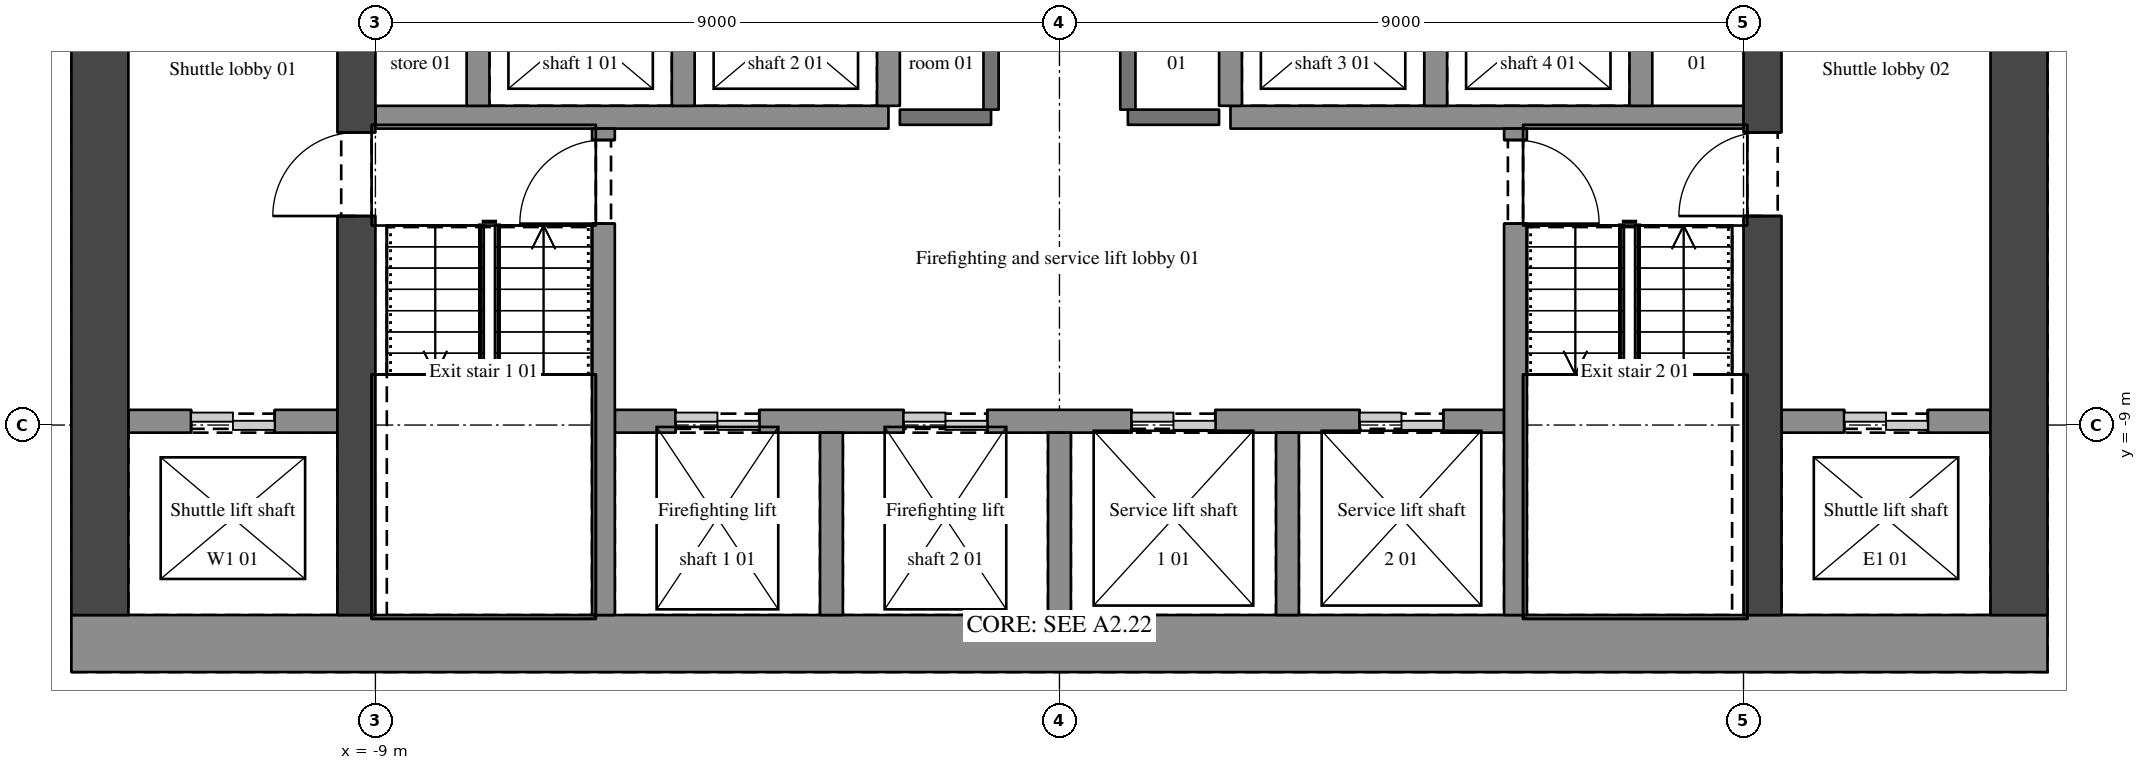
"""IFC4 building model, lengths in metres.
Left out: names, types, materials, properties, quantities, classifications, styles, units other than length and angle.
Written with IfcOpenShell. Run it as: python <this file> out.ifc"""

import sys

from ifc_helpers import new_model, si_unit, direction, frame, frame_2d, origin, place, context, subcontext, project, spatial, rectangle, extrude, element, fill, save


model = new_model("IFC4")
c1 = context("Model", 3, precision=1e-05, world=origin(), true_north=direction((0.0, 1.0)))
c2 = subcontext(c1, "Body", "Model", "MODEL_VIEW")
j1 = project(units=[si_unit("LENGTHUNIT", "METRE"), si_unit("PLANEANGLEUNIT", "RADIAN")], contexts=[c1])
p1 = place(None, origin())
s1 = spatial("IfcSite", under=j1, at=p1, CompositionType="ELEMENT")
p2 = place(p1, origin())
s2 = spatial("IfcBuilding", under=s1, at=p2, CompositionType="ELEMENT")
p3 = place(p2, frame((0.0, 0.0, 162.3)))
s3 = spatial("IfcBuildingStorey", under=s2, at=p3, CompositionType="ELEMENT", Elevation=162.3)
p4 = place(p3, frame((-13.0, -11.875, 0.0), z_axis=(0.0, 0.0, 1.0), x_axis=(1.0, 0.0, 0.0)))
e1 = element("IfcWall", 1, at=p4, inside=s3, PredefinedType="SHEAR", context=c2, shape_type="SweptSolid", body=[
    extrude(rectangle(XDim=26.0, YDim=0.75, at=frame_2d((13.0, 0.0))), origin(), (0.0, 0.0, 1.0), 5.4),
])
p5 = place(p3, frame((-12.625, -11.5, 0.0), z_axis=(0.0, 0.0, 1.0), x_axis=(0.0, 1.0, 0.0)))
e2 = element("IfcWall", 2, at=p5, inside=s3, PredefinedType="SHEAR", context=c2, shape_type="SweptSolid", body=[
    extrude(rectangle(XDim=14.65, YDim=0.75, at=frame_2d((7.325, 0.0))), origin(), (0.0, 0.0, 1.0), 5.4),
])
p6 = place(p5, frame((9.6, 0.0, 0.0)))
e3 = element("IfcOpeningElement", 3, at=p6, cuts=e2, PredefinedType="OPENING", context=c2, shape_type="SweptSolid", body=[
    extrude(rectangle(XDim=1.8, YDim=2.1, at=frame_2d((0.9, 1.05))), frame((0.0, 0.385, 0.0), z_axis=(0.0, -1.0, 0.0), x_axis=(1.0, 0.0, 0.0)), (0.0, 0.0, 1.0), 0.77),
])
p7 = place(p3, frame((12.625, -11.5, 0.0), z_axis=(0.0, 0.0, 1.0), x_axis=(0.0, 1.0, 0.0)))
e4 = element("IfcWall", 4, at=p7, inside=s3, PredefinedType="SHEAR", context=c2, shape_type="SweptSolid", body=[
    extrude(rectangle(XDim=14.65, YDim=0.75, at=frame_2d((7.325, 0.0))), origin(), (0.0, 0.0, 1.0), 5.4),
])
p8 = place(p7, frame((9.6, 0.0, 0.0)))
e5 = element("IfcOpeningElement", 5, at=p8, cuts=e4, PredefinedType="OPENING", context=c2, shape_type="SweptSolid", body=[
    extrude(rectangle(XDim=1.8, YDim=2.1, at=frame_2d((0.9, 1.05))), frame((0.0, 0.385, 0.0), z_axis=(0.0, -1.0, 0.0), x_axis=(1.0, 0.0, 0.0)), (0.0, 0.0, 1.0), 0.77),
])
p9 = place(p3, frame((-9.25, -11.5, 0.0), z_axis=(0.0, 0.0, 1.0), x_axis=(0.0, 1.0, 0.0)))
e6 = element("IfcWall", 6, at=p9, inside=s3, PredefinedType="SHEAR", context=c2, shape_type="SweptSolid", body=[
    extrude(rectangle(XDim=11.65, YDim=0.5, at=frame_2d((5.825, 0.0))), origin(), (0.0, 0.0, 1.0), 5.4),
])
p10 = place(p9, frame((9.4, 0.0, 0.0)))
e7 = element("IfcOpeningElement", 7, at=p10, cuts=e6, PredefinedType="OPENING", context=c2, shape_type="SweptSolid", body=[
    extrude(rectangle(XDim=1.8, YDim=2.1, at=frame_2d((0.9, 1.05))), frame((0.0, 0.26, 0.0), z_axis=(0.0, -1.0, 0.0), x_axis=(1.0, 0.0, 0.0)), (0.0, 0.0, 1.0), 0.52),
])
p11 = place(p9, frame((5.25, 0.0, 0.0)))
e8 = element("IfcOpeningElement", 8, at=p11, cuts=e6, PredefinedType="OPENING", context=c2, shape_type="SweptSolid", body=[
    extrude(rectangle(XDim=1.1, YDim=2.1, at=frame_2d((0.55, 1.05))), frame((0.0, 0.26, 0.0), z_axis=(0.0, -1.0, 0.0), x_axis=(1.0, 0.0, 0.0)), (0.0, 0.0, 1.0), 0.52),
])
p12 = place(p3, frame((9.25, -11.5, 0.0), z_axis=(0.0, 0.0, 1.0), x_axis=(0.0, 1.0, 0.0)))
e9 = element("IfcWall", 9, at=p12, inside=s3, PredefinedType="SHEAR", context=c2, shape_type="SweptSolid", body=[
    extrude(rectangle(XDim=11.65, YDim=0.5, at=frame_2d((5.825, 0.0))), origin(), (0.0, 0.0, 1.0), 5.4),
])
p13 = place(p12, frame((9.4, 0.0, 0.0)))
e10 = element("IfcOpeningElement", 10, at=p13, cuts=e9, PredefinedType="OPENING", context=c2, shape_type="SweptSolid", body=[
    extrude(rectangle(XDim=1.8, YDim=2.1, at=frame_2d((0.9, 1.05))), frame((0.0, 0.26, 0.0), z_axis=(0.0, -1.0, 0.0), x_axis=(1.0, 0.0, 0.0)), (0.0, 0.0, 1.0), 0.52),
])
p14 = place(p12, frame((5.25, 0.0, 0.0)))
e11 = element("IfcOpeningElement", 11, at=p14, cuts=e9, PredefinedType="OPENING", context=c2, shape_type="SweptSolid", body=[
    extrude(rectangle(XDim=1.1, YDim=2.1, at=frame_2d((0.55, 1.05))), frame((0.0, 0.26, 0.0), z_axis=(0.0, -1.0, 0.0), x_axis=(1.0, 0.0, 0.0)), (0.0, 0.0, 1.0), 0.52),
])
p15 = place(p3, frame((-12.25, -8.95, 0.0), z_axis=(0.0, 0.0, 1.0), x_axis=(1.0, 0.0, 0.0)))
e12 = element("IfcWall", 12, at=p15, inside=s3, PredefinedType="SHEAR", context=c2, shape_type="SweptSolid", body=[
    extrude(rectangle(XDim=2.75, YDim=0.3, at=frame_2d((1.375, 0.0))), origin(), (0.0, 0.0, 1.0), 5.4),
])
p16 = place(p15, frame((0.825, 0.0, 0.0)))
e13 = element("IfcOpeningElement", 13, at=p16, cuts=e12, PredefinedType="OPENING", context=c2, shape_type="SweptSolid", body=[
    extrude(rectangle(XDim=1.1, YDim=2.1, at=frame_2d((0.55, 1.05))), frame((0.0, 0.16, 0.0), z_axis=(0.0, -1.0, 0.0), x_axis=(1.0, 0.0, 0.0)), (0.0, 0.0, 1.0), 0.32),
])
p17 = place(p3, frame((-5.85, -8.95, 0.0), z_axis=(0.0, 0.0, 1.0), x_axis=(1.0, 0.0, 0.0)))
e14 = element("IfcWall", 14, at=p17, inside=s3, PredefinedType="SHEAR", context=c2, shape_type="SweptSolid", body=[
    extrude(rectangle(XDim=11.7, YDim=0.3, at=frame_2d((5.85, 0.0))), origin(), (0.0, 0.0, 1.0), 5.4),
])
p18 = place(p17, frame((0.8, 0.0, 0.0)))
e15 = element("IfcOpeningElement", 15, at=p18, cuts=e14, PredefinedType="OPENING", context=c2, shape_type="SweptSolid", body=[
    extrude(rectangle(XDim=1.1, YDim=2.1, at=frame_2d((0.55, 1.05))), frame((0.0, 0.16, 0.0), z_axis=(0.0, -1.0, 0.0), x_axis=(1.0, 0.0, 0.0)), (0.0, 0.0, 1.0), 0.32),
])
p19 = place(p17, frame((3.8, 0.0, 0.0)))
e16 = element("IfcOpeningElement", 16, at=p19, cuts=e14, PredefinedType="OPENING", context=c2, shape_type="SweptSolid", body=[
    extrude(rectangle(XDim=1.1, YDim=2.1, at=frame_2d((0.55, 1.05))), frame((0.0, 0.16, 0.0), z_axis=(0.0, -1.0, 0.0), x_axis=(1.0, 0.0, 0.0)), (0.0, 0.0, 1.0), 0.32),
])
p20 = place(p17, frame((6.8, 0.0, 0.0)))
e17 = element("IfcOpeningElement", 17, at=p20, cuts=e14, PredefinedType="OPENING", context=c2, shape_type="SweptSolid", body=[
    extrude(rectangle(XDim=1.1, YDim=2.1, at=frame_2d((0.55, 1.05))), frame((0.0, 0.16, 0.0), z_axis=(0.0, -1.0, 0.0), x_axis=(1.0, 0.0, 0.0)), (0.0, 0.0, 1.0), 0.32),
])
p21 = place(p17, frame((9.8, 0.0, 0.0)))
e18 = element("IfcOpeningElement", 18, at=p21, cuts=e14, PredefinedType="OPENING", context=c2, shape_type="SweptSolid", body=[
    extrude(rectangle(XDim=1.1, YDim=2.1, at=frame_2d((0.55, 1.05))), frame((0.0, 0.16, 0.0), z_axis=(0.0, -1.0, 0.0), x_axis=(1.0, 0.0, 0.0)), (0.0, 0.0, 1.0), 0.32),
])
p22 = place(p3, frame((9.5, -8.95, 0.0), z_axis=(0.0, 0.0, 1.0), x_axis=(1.0, 0.0, 0.0)))
e19 = element("IfcWall", 19, at=p22, inside=s3, PredefinedType="SHEAR", context=c2, shape_type="SweptSolid", body=[
    extrude(rectangle(XDim=2.75, YDim=0.3, at=frame_2d((1.375, 0.0))), origin(), (0.0, 0.0, 1.0), 5.4),
])
p23 = place(p22, frame((0.825, 0.0, 0.0)))
e20 = element("IfcOpeningElement", 20, at=p23, cuts=e19, PredefinedType="OPENING", context=c2, shape_type="SweptSolid", body=[
    extrude(rectangle(XDim=1.1, YDim=2.1, at=frame_2d((0.55, 1.05))), frame((0.0, 0.16, 0.0), z_axis=(0.0, -1.0, 0.0), x_axis=(1.0, 0.0, 0.0)), (0.0, 0.0, 1.0), 0.32),
])
p24 = place(p3, frame((-9.0, -4.95, 0.0), z_axis=(0.0, 0.0, 1.0), x_axis=(1.0, 0.0, 0.0)))
e21 = element("IfcWall", 21, at=p24, inside=s3, PredefinedType="SHEAR", context=c2, shape_type="SweptSolid", body=[
    extrude(rectangle(XDim=6.75, YDim=0.3, at=frame_2d((3.375, 0.0))), origin(), (0.0, 0.0, 1.0), 5.4),
])
for number, where, z_axis, x_axis in (
    (22, (-2.1, -4.95, 0.0), (0.0, 0.0, 1.0), (1.0, 0.0, 0.0)),
    (23, (0.9, -4.95, 0.0), (0.0, 0.0, 1.0), (1.0, 0.0, 0.0)),
):
    element("IfcWall", number, at=place(p3, frame(where, z_axis=z_axis, x_axis=x_axis)), inside=s3, PredefinedType="SOLIDWALL", context=c2, shape_type="SweptSolid", body=[
        extrude(rectangle(XDim=1.2, YDim=0.2, at=frame_2d((0.6, 0.0))), origin(), (0.0, 0.0, 1.0), 5.1),
    ])
p25 = place(p3, frame((2.25, -4.95, 0.0), z_axis=(0.0, 0.0, 1.0), x_axis=(1.0, 0.0, 0.0)))
e24 = element("IfcWall", 24, at=p25, inside=s3, PredefinedType="SHEAR", context=c2, shape_type="SweptSolid", body=[
    extrude(rectangle(XDim=6.75, YDim=0.3, at=frame_2d((3.375, 0.0))), origin(), (0.0, 0.0, 1.0), 5.4),
])
p26 = place(p3, frame((-7.65, -4.8, 0.0), z_axis=(0.0, 0.0, 1.0), x_axis=(0.0, 1.0, 0.0)))
e25 = element("IfcWall", 25, at=p26, inside=s3, PredefinedType="SHEAR", context=c2, shape_type="SweptSolid", body=[
    extrude(rectangle(XDim=2.05, YDim=0.3, at=frame_2d((1.025, 0.0))), origin(), (0.0, 0.0, 1.0), 5.4),
])
p27 = place(p3, frame((-6.0, -11.5, 0.0), z_axis=(0.0, 0.0, 1.0), x_axis=(0.0, 1.0, 0.0)))
e26 = element("IfcWall", 26, at=p27, inside=s3, PredefinedType="SHEAR", context=c2, shape_type="SweptSolid", body=[
    extrude(rectangle(XDim=6.4, YDim=0.3, at=frame_2d((3.2, 0.0))), origin(), (0.0, 0.0, 1.0), 5.4),
])
p28 = place(p27, frame((5.15, 0.0, 0.0)))
e27 = element("IfcOpeningElement", 27, at=p28, cuts=e26, PredefinedType="OPENING", context=c2, shape_type="SweptSolid", body=[
    extrude(rectangle(XDim=1.1, YDim=2.1, at=frame_2d((0.55, 1.05))), frame((0.0, 0.16, 0.0), z_axis=(0.0, -1.0, 0.0), x_axis=(1.0, 0.0, 0.0)), (0.0, 0.0, 1.0), 0.32),
])
p29 = place(p3, frame((-4.95, -4.8, 0.0), z_axis=(0.0, 0.0, 1.0), x_axis=(0.0, 1.0, 0.0)))
e28 = element("IfcWall", 28, at=p29, inside=s3, PredefinedType="SHEAR", context=c2, shape_type="SweptSolid", body=[
    extrude(rectangle(XDim=2.05, YDim=0.3, at=frame_2d((1.025, 0.0))), origin(), (0.0, 0.0, 1.0), 5.4),
])
p30 = place(p3, frame((-3.0, -11.5, 0.0), z_axis=(0.0, 0.0, 1.0), x_axis=(0.0, 1.0, 0.0)))
e29 = element("IfcWall", 29, at=p30, inside=s3, PredefinedType="SHEAR", context=c2, shape_type="SweptSolid", body=[
    extrude(rectangle(XDim=2.4, YDim=0.3, at=frame_2d((1.2, 0.0))), origin(), (0.0, 0.0, 1.0), 5.4),
])
p31 = place(p3, frame((-2.25, -4.8, 0.0), z_axis=(0.0, 0.0, 1.0), x_axis=(0.0, 1.0, 0.0)))
e30 = element("IfcWall", 30, at=p31, inside=s3, PredefinedType="SHEAR", context=c2, shape_type="SweptSolid", body=[
    extrude(rectangle(XDim=2.05, YDim=0.3, at=frame_2d((1.025, 0.0))), origin(), (0.0, 0.0, 1.0), 5.4),
])
p32 = place(p3, frame((-0.9, -4.85, 0.0), z_axis=(0.0, 0.0, 1.0), x_axis=(0.0, 1.0, 0.0)))
e31 = element("IfcWall", 31, at=p32, inside=s3, PredefinedType="SOLIDWALL", context=c2, shape_type="SweptSolid", body=[
    extrude(rectangle(XDim=2.15, YDim=0.2, at=frame_2d((1.075, 0.0))), origin(), (0.0, 0.0, 1.0), 5.1),
])
p33 = place(p3, frame((0.0, -11.5, 0.0), z_axis=(0.0, 0.0, 1.0), x_axis=(0.0, 1.0, 0.0)))
e32 = element("IfcWall", 32, at=p33, inside=s3, PredefinedType="SHEAR", context=c2, shape_type="SweptSolid", body=[
    extrude(rectangle(XDim=2.4, YDim=0.3, at=frame_2d((1.2, 0.0))), origin(), (0.0, 0.0, 1.0), 5.4),
])
p34 = place(p3, frame((0.9, -4.85, 0.0), z_axis=(0.0, 0.0, 1.0), x_axis=(0.0, 1.0, 0.0)))
e33 = element("IfcWall", 33, at=p34, inside=s3, PredefinedType="SOLIDWALL", context=c2, shape_type="SweptSolid", body=[
    extrude(rectangle(XDim=2.15, YDim=0.2, at=frame_2d((1.075, 0.0))), origin(), (0.0, 0.0, 1.0), 5.1),
])
p35 = place(p3, frame((2.25, -4.8, 0.0), z_axis=(0.0, 0.0, 1.0), x_axis=(0.0, 1.0, 0.0)))
e34 = element("IfcWall", 34, at=p35, inside=s3, PredefinedType="SHEAR", context=c2, shape_type="SweptSolid", body=[
    extrude(rectangle(XDim=2.05, YDim=0.3, at=frame_2d((1.025, 0.0))), origin(), (0.0, 0.0, 1.0), 5.4),
])
p36 = place(p3, frame((3.0, -11.5, 0.0), z_axis=(0.0, 0.0, 1.0), x_axis=(0.0, 1.0, 0.0)))
e35 = element("IfcWall", 35, at=p36, inside=s3, PredefinedType="SHEAR", context=c2, shape_type="SweptSolid", body=[
    extrude(rectangle(XDim=2.4, YDim=0.3, at=frame_2d((1.2, 0.0))), origin(), (0.0, 0.0, 1.0), 5.4),
])
p37 = place(p3, frame((4.95, -4.8, 0.0), z_axis=(0.0, 0.0, 1.0), x_axis=(0.0, 1.0, 0.0)))
e36 = element("IfcWall", 36, at=p37, inside=s3, PredefinedType="SHEAR", context=c2, shape_type="SweptSolid", body=[
    extrude(rectangle(XDim=2.05, YDim=0.3, at=frame_2d((1.025, 0.0))), origin(), (0.0, 0.0, 1.0), 5.4),
])
p38 = place(p3, frame((6.0, -5.1, 0.0), z_axis=(0.0, 0.0, 1.0), x_axis=(0.0, -1.0, 0.0)))
e37 = element("IfcWall", 37, at=p38, inside=s3, PredefinedType="SHEAR", context=c2, shape_type="SweptSolid", body=[
    extrude(rectangle(XDim=6.4, YDim=0.3, at=frame_2d((3.2, 0.0))), origin(), (0.0, 0.0, 1.0), 5.4),
])
p39 = place(p38, frame((0.15, 0.0, 0.0)))
e38 = element("IfcOpeningElement", 38, at=p39, cuts=e37, PredefinedType="OPENING", context=c2, shape_type="SweptSolid", body=[
    extrude(rectangle(XDim=1.1, YDim=2.1, at=frame_2d((0.55, 1.05))), frame((0.0, 0.16, 0.0), z_axis=(0.0, -1.0, 0.0), x_axis=(1.0, 0.0, 0.0)), (0.0, 0.0, 1.0), 0.32),
])
p40 = place(p3, frame((7.65, -4.8, 0.0), z_axis=(0.0, 0.0, 1.0), x_axis=(0.0, 1.0, 0.0)))
e39 = element("IfcWall", 39, at=p40, inside=s3, PredefinedType="SHEAR", context=c2, shape_type="SweptSolid", body=[
    extrude(rectangle(XDim=2.05, YDim=0.3, at=frame_2d((1.025, 0.0))), origin(), (0.0, 0.0, 1.0), 5.4),
])
p41 = place(p28, origin())
e40 = element("IfcDoor", 40, at=p41, inside=s3, OperationType="SINGLE_SWING_LEFT", PredefinedType="DOOR", context=c2, shape_type="SweptSolid", body=[
    extrude(rectangle(XDim=1.1, YDim=2.1, at=frame_2d((0.55, 1.05))), frame((0.0, 0.025, 0.0), z_axis=(0.0, -1.0, 0.0), x_axis=(1.0, 0.0, 0.0)), (0.0, 0.0, 1.0), 0.05),
])
fill(e27, e40)
p42 = place(p11, origin())
e41 = element("IfcDoor", 41, at=p42, inside=s3, OperationType="SINGLE_SWING_LEFT", PredefinedType="DOOR", context=c2, shape_type="SweptSolid", body=[
    extrude(rectangle(XDim=1.1, YDim=2.1, at=frame_2d((0.55, 1.05))), frame((0.0, 0.025, 0.0), z_axis=(0.0, -1.0, 0.0), x_axis=(1.0, 0.0, 0.0)), (0.0, 0.0, 1.0), 0.05),
])
fill(e8, e41)
p43 = place(p39, origin())
e42 = element("IfcDoor", 42, at=p43, inside=s3, OperationType="SINGLE_SWING_RIGHT", PredefinedType="DOOR", context=c2, shape_type="SweptSolid", body=[
    extrude(rectangle(XDim=1.1, YDim=2.1, at=frame_2d((0.55, 1.05))), frame((0.0, 0.025, 0.0), z_axis=(0.0, -1.0, 0.0), x_axis=(1.0, 0.0, 0.0)), (0.0, 0.0, 1.0), 0.05),
])
fill(e38, e42)
p44 = place(p14, origin())
e43 = element("IfcDoor", 43, at=p44, inside=s3, OperationType="SINGLE_SWING_LEFT", PredefinedType="DOOR", context=c2, shape_type="SweptSolid", body=[
    extrude(rectangle(XDim=1.1, YDim=2.1, at=frame_2d((0.55, 1.05))), frame((0.0, 0.025, 0.0), z_axis=(0.0, -1.0, 0.0), x_axis=(1.0, 0.0, 0.0)), (0.0, 0.0, 1.0), 0.05),
])
fill(e11, e43)
p45 = place(p18, origin())
e44 = element("IfcDoor", 44, at=p45, inside=s3, OperationType="DOUBLE_DOOR_SLIDING", PredefinedType="DOOR", context=c2, shape_type="SweptSolid", body=[
    extrude(rectangle(XDim=1.1, YDim=2.1, at=frame_2d((0.55, 1.05))), frame((0.0, 0.025, 0.0), z_axis=(0.0, -1.0, 0.0), x_axis=(1.0, 0.0, 0.0)), (0.0, 0.0, 1.0), 0.05),
])
fill(e15, e44)
p46 = place(p19, origin())
e45 = element("IfcDoor", 45, at=p46, inside=s3, OperationType="DOUBLE_DOOR_SLIDING", PredefinedType="DOOR", context=c2, shape_type="SweptSolid", body=[
    extrude(rectangle(XDim=1.1, YDim=2.1, at=frame_2d((0.55, 1.05))), frame((0.0, 0.025, 0.0), z_axis=(0.0, -1.0, 0.0), x_axis=(1.0, 0.0, 0.0)), (0.0, 0.0, 1.0), 0.05),
])
fill(e16, e45)
p47 = place(p23, origin())
e46 = element("IfcDoor", 46, at=p47, inside=s3, OperationType="DOUBLE_DOOR_SLIDING", PredefinedType="DOOR", context=c2, shape_type="SweptSolid", body=[
    extrude(rectangle(XDim=1.1, YDim=2.1, at=frame_2d((0.55, 1.05))), frame((0.0, 0.025, 0.0), z_axis=(0.0, -1.0, 0.0), x_axis=(1.0, 0.0, 0.0)), (0.0, 0.0, 1.0), 0.05),
])
fill(e20, e46)
p48 = place(p16, origin())
e47 = element("IfcDoor", 47, at=p48, inside=s3, OperationType="DOUBLE_DOOR_SLIDING", PredefinedType="DOOR", context=c2, shape_type="SweptSolid", body=[
    extrude(rectangle(XDim=1.1, YDim=2.1, at=frame_2d((0.55, 1.05))), frame((0.0, 0.025, 0.0), z_axis=(0.0, -1.0, 0.0), x_axis=(1.0, 0.0, 0.0)), (0.0, 0.0, 1.0), 0.05),
])
fill(e13, e47)
p49 = place(p20, origin())
e48 = element("IfcDoor", 48, at=p49, inside=s3, OperationType="DOUBLE_DOOR_SLIDING", PredefinedType="DOOR", context=c2, shape_type="SweptSolid", body=[
    extrude(rectangle(XDim=1.1, YDim=2.1, at=frame_2d((0.55, 1.05))), frame((0.0, 0.025, 0.0), z_axis=(0.0, -1.0, 0.0), x_axis=(1.0, 0.0, 0.0)), (0.0, 0.0, 1.0), 0.05),
])
fill(e17, e48)
p50 = place(p21, origin())
e49 = element("IfcDoor", 49, at=p50, inside=s3, OperationType="DOUBLE_DOOR_SLIDING", PredefinedType="DOOR", context=c2, shape_type="SweptSolid", body=[
    extrude(rectangle(XDim=1.1, YDim=2.1, at=frame_2d((0.55, 1.05))), frame((0.0, 0.025, 0.0), z_axis=(0.0, -1.0, 0.0), x_axis=(1.0, 0.0, 0.0)), (0.0, 0.0, 1.0), 0.05),
])
fill(e18, e49)
save(model, sys.argv[1])
